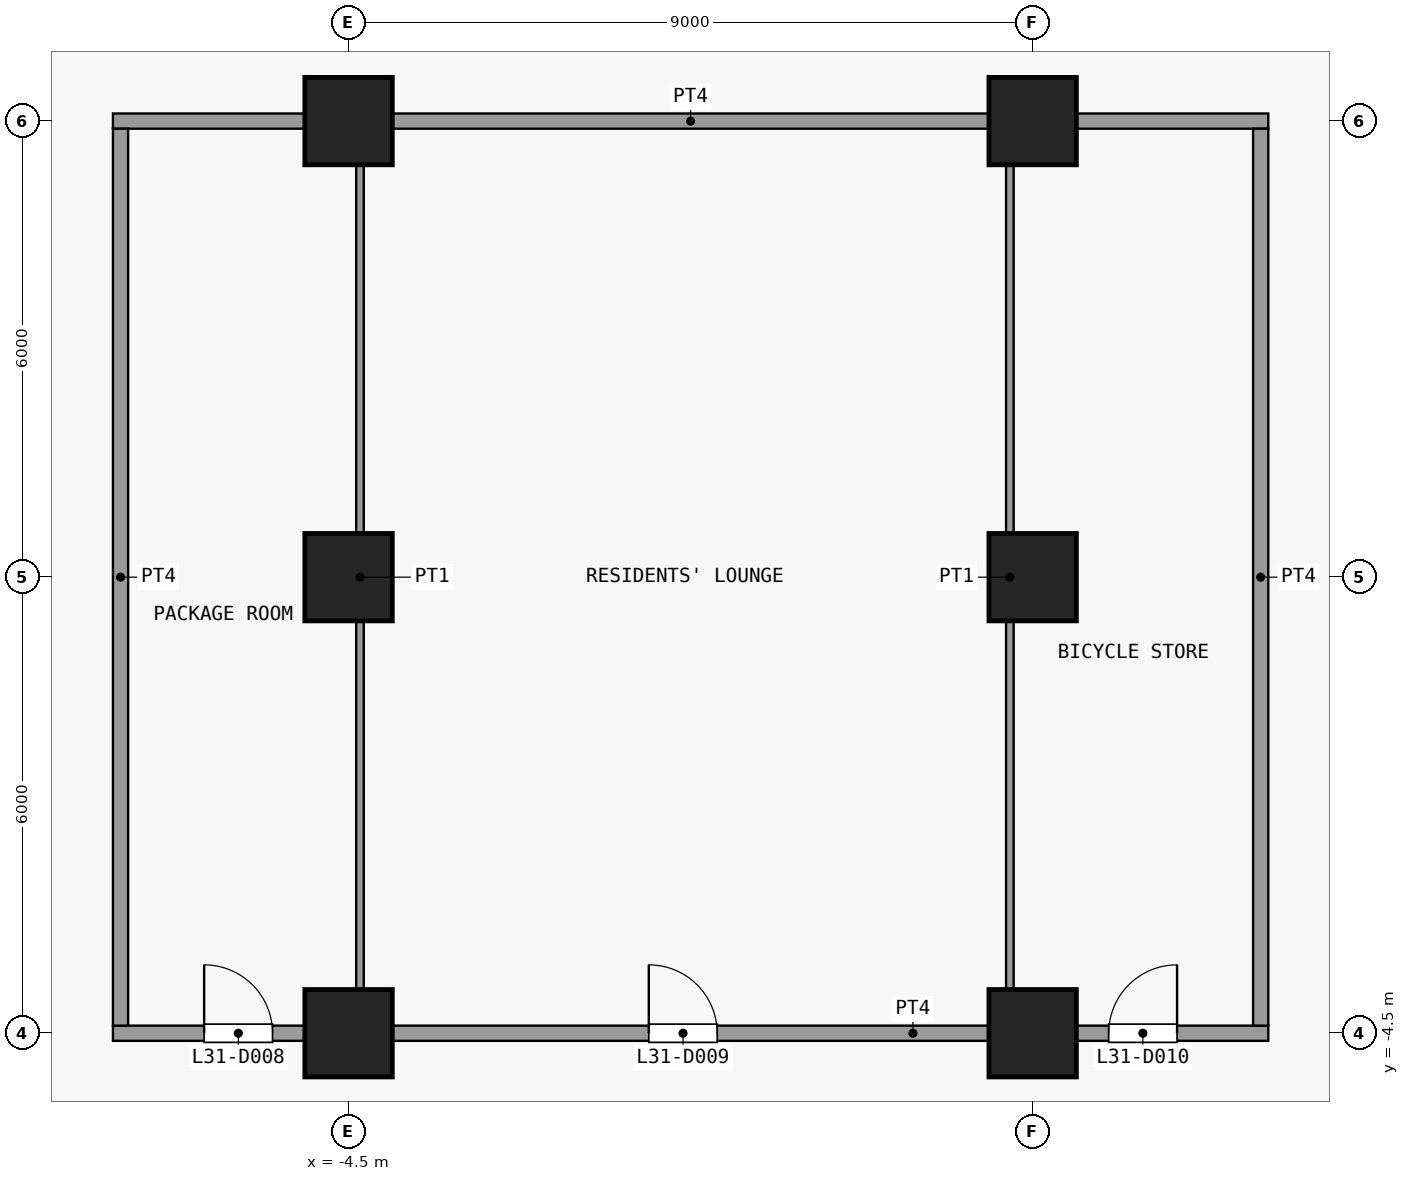
"""IFC4 building model, lengths in metres.
Left out: names, types, materials, properties, quantities, classifications, styles, units other than length and angle.
Written with IfcOpenShell. Run it as: python <this file> out.ifc"""

import sys

from ifc_helpers import new_model, si_unit, direction, frame, frame_2d, origin, origin_2d, place, context, subcontext, project, spatial, rectangle, extrude, element, fill, save


model = new_model("IFC4")
c1 = context("Model", 3, precision=1e-05, world=origin(), true_north=direction((0.0, 1.0)))
c2 = subcontext(c1, "Body", "Model", "MODEL_VIEW")
j1 = project(units=[si_unit("LENGTHUNIT", "METRE"), si_unit("PLANEANGLEUNIT", "RADIAN")], contexts=[c1])
p1 = place(None, origin())
s1 = spatial("IfcSite", under=j1, at=p1, CompositionType="ELEMENT")
p2 = place(p1, origin())
s2 = spatial("IfcBuilding", under=s1, at=p2, CompositionType="ELEMENT")
p3 = place(p2, frame((0.0, 0.0, 124.3)))
s3 = spatial("IfcBuildingStorey", under=s2, at=p3, CompositionType="ELEMENT", Elevation=124.3)
for number, where, z_axis, x_axis in (
    (1, (-4.5, -4.5, 0.0), (0.0, 0.0, 1.0), (1.0, 0.0, 0.0)),
    (2, (-4.5, 1.5, 0.0), (0.0, 0.0, 1.0), (1.0, 0.0, 0.0)),
    (3, (-4.5, 7.5, 0.0), (0.0, 0.0, 1.0), (1.0, 0.0, 0.0)),
    (4, (4.5, -4.5, 0.0), (0.0, 0.0, 1.0), (1.0, 0.0, 0.0)),
    (5, (4.5, 1.5, 0.0), (0.0, 0.0, 1.0), (1.0, 0.0, 0.0)),
    (6, (4.5, 7.5, 0.0), (0.0, 0.0, 1.0), (1.0, 0.0, 0.0)),
):
    element("IfcColumn", number, at=place(p3, frame(where, z_axis=z_axis, x_axis=x_axis)), inside=s3, PredefinedType="COLUMN", context=c2, shape_type="SweptSolid", body=[
        extrude(rectangle(XDim=1.15, YDim=1.15, at=origin_2d()), origin(), (0.0, 0.0, 1.0), 3.6),
    ])
p4 = place(p3, frame((-7.6, -4.5, 0.0), z_axis=(0.0, 0.0, 1.0), x_axis=(1.0, 0.0, 0.0)))
e7 = element("IfcWall", 7, at=p4, inside=s3, PredefinedType="PARTITIONING", context=c2, shape_type="SweptSolid", body=[
    extrude(rectangle(XDim=15.2, YDim=0.2, at=frame_2d((7.6, 0.0))), origin(), (0.0, 0.0, 1.0), 3.3),
])
p5 = place(p4, frame((1.2, 0.0, 0.0)))
e8 = element("IfcOpeningElement", 8, at=p5, cuts=e7, PredefinedType="OPENING", context=c2, shape_type="SweptSolid", body=[
    extrude(rectangle(XDim=0.9, YDim=2.1, at=frame_2d((0.45, 1.05))), frame((0.0, 0.11, 0.0), z_axis=(0.0, -1.0, 0.0), x_axis=(1.0, 0.0, 0.0)), (0.0, 0.0, 1.0), 0.22),
])
p6 = place(p4, frame((7.05, 0.0, 0.0)))
e9 = element("IfcOpeningElement", 9, at=p6, cuts=e7, PredefinedType="OPENING", context=c2, shape_type="SweptSolid", body=[
    extrude(rectangle(XDim=0.9, YDim=2.1, at=frame_2d((0.45, 1.05))), frame((0.0, 0.11, 0.0), z_axis=(0.0, -1.0, 0.0), x_axis=(1.0, 0.0, 0.0)), (0.0, 0.0, 1.0), 0.22),
])
p7 = place(p4, frame((13.1, 0.0, 0.0)))
e10 = element("IfcOpeningElement", 10, at=p7, cuts=e7, PredefinedType="OPENING", context=c2, shape_type="SweptSolid", body=[
    extrude(rectangle(XDim=0.9, YDim=2.1, at=frame_2d((0.45, 1.05))), frame((0.0, 0.11, 0.0), z_axis=(0.0, -1.0, 0.0), x_axis=(1.0, 0.0, 0.0)), (0.0, 0.0, 1.0), 0.22),
])
p8 = place(p3, frame((-7.6, 7.5, 0.0), z_axis=(0.0, 0.0, 1.0), x_axis=(1.0, 0.0, 0.0)))
e11 = element("IfcWall", 11, at=p8, inside=s3, PredefinedType="PARTITIONING", context=c2, shape_type="SweptSolid", body=[
    extrude(rectangle(XDim=15.2, YDim=0.2, at=frame_2d((7.6, 0.0))), origin(), (0.0, 0.0, 1.0), 3.3),
])
p9 = place(p3, frame((-7.5, -4.4, 0.0), z_axis=(0.0, 0.0, 1.0), x_axis=(0.0, 1.0, 0.0)))
e12 = element("IfcWall", 12, at=p9, inside=s3, PredefinedType="PARTITIONING", context=c2, shape_type="SweptSolid", body=[
    extrude(rectangle(XDim=11.8, YDim=0.2, at=frame_2d((5.9, 0.0))), origin(), (0.0, 0.0, 1.0), 3.3),
])
for number, where, z_axis, x_axis in (
    (13, (-4.35, -4.4, 0.0), (0.0, 0.0, 1.0), (0.0, 1.0, 0.0)),
    (14, (4.2, -4.4, 0.0), (0.0, 0.0, 1.0), (0.0, 1.0, 0.0)),
):
    element("IfcWall", number, at=place(p3, frame(where, z_axis=z_axis, x_axis=x_axis)), inside=s3, PredefinedType="PARTITIONING", context=c2, shape_type="SweptSolid", body=[
        extrude(rectangle(XDim=11.8, YDim=0.1, at=frame_2d((5.9, 0.0))), origin(), (0.0, 0.0, 1.0), 3.3),
    ])
p10 = place(p3, frame((7.5, -4.4, 0.0), z_axis=(0.0, 0.0, 1.0), x_axis=(0.0, 1.0, 0.0)))
e15 = element("IfcWall", 15, at=p10, inside=s3, PredefinedType="PARTITIONING", context=c2, shape_type="SweptSolid", body=[
    extrude(rectangle(XDim=11.8, YDim=0.2, at=frame_2d((5.9, 0.0))), origin(), (0.0, 0.0, 1.0), 3.3),
])
p11 = place(p5, origin())
e16 = element("IfcDoor", 16, at=p11, inside=s3, OperationType="SINGLE_SWING_RIGHT", PredefinedType="DOOR", context=c2, shape_type="SweptSolid", body=[
    extrude(rectangle(XDim=0.9, YDim=2.1, at=frame_2d((0.45, 1.05))), frame((0.0, 0.025, 0.0), z_axis=(0.0, -1.0, 0.0), x_axis=(1.0, 0.0, 0.0)), (0.0, 0.0, 1.0), 0.05),
])
fill(e8, e16)
p12 = place(p6, origin())
e17 = element("IfcDoor", 17, at=p12, inside=s3, OperationType="SINGLE_SWING_RIGHT", PredefinedType="DOOR", context=c2, shape_type="SweptSolid", body=[
    extrude(rectangle(XDim=0.9, YDim=2.1, at=frame_2d((0.45, 1.05))), frame((0.0, 0.025, 0.0), z_axis=(0.0, -1.0, 0.0), x_axis=(1.0, 0.0, 0.0)), (0.0, 0.0, 1.0), 0.05),
])
fill(e9, e17)
p13 = place(p7, origin())
e18 = element("IfcDoor", 18, at=p13, inside=s3, OperationType="SINGLE_SWING_LEFT", PredefinedType="DOOR", context=c2, shape_type="SweptSolid", body=[
    extrude(rectangle(XDim=0.9, YDim=2.1, at=frame_2d((0.45, 1.05))), frame((0.0, 0.025, 0.0), z_axis=(0.0, -1.0, 0.0), x_axis=(1.0, 0.0, 0.0)), (0.0, 0.0, 1.0), 0.05),
])
fill(e10, e18)
save(model, sys.argv[1])
